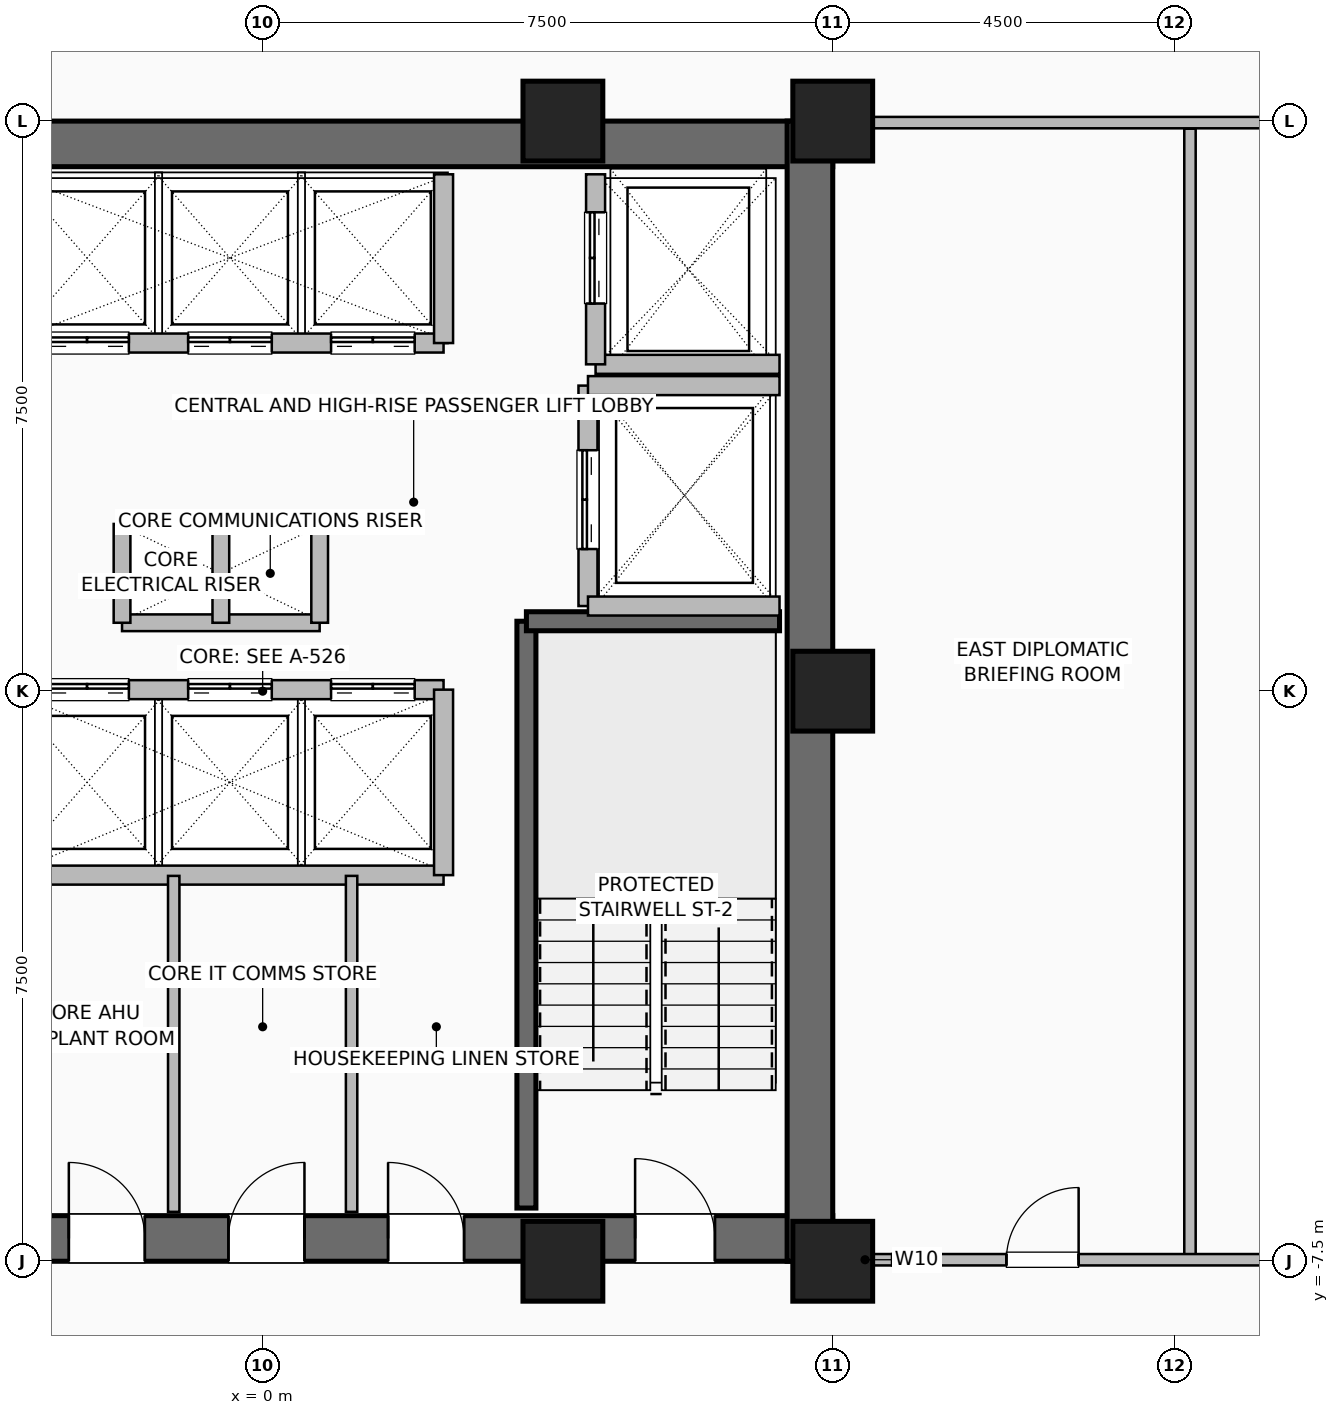
"""IFC4 building model, lengths in metres.
Left out: names, types, materials, properties, quantities, classifications, styles, units other than length and angle.
Written with IfcOpenShell. Run it as: python <this file> out.ifc"""

import sys

from ifc_helpers import new_model, si_unit, direction, frame, frame_2d, origin, origin_2d, place, context, subcontext, project, spatial, rectangle, hollow_rectangle, extrude, element, fill, save


model = new_model("IFC4")
c1 = context("Model", 3, precision=1e-05, world=origin(), true_north=direction((0.0, 1.0)))
c2 = subcontext(c1, "Body", "Model", "MODEL_VIEW")
j1 = project(units=[si_unit("LENGTHUNIT", "METRE"), si_unit("PLANEANGLEUNIT", "RADIAN")], contexts=[c1])
p1 = place(None, origin())
s1 = spatial("IfcSite", under=j1, at=p1, CompositionType="ELEMENT")
p2 = place(p1, origin())
s2 = spatial("IfcBuilding", under=s1, at=p2, CompositionType="ELEMENT")
p3 = place(p2, frame((0.0, 0.0, 101.2)))
s3 = spatial("IfcBuildingStorey", under=s2, at=p3, CompositionType="ELEMENT", Elevation=101.2)
for number, where, z_axis, x_axis in (
    (1, (3.95, -7.5, 0.0), (0.0, 0.0, 1.0), (1.0, 0.0, 0.0)),
    (2, (7.5, -7.5, 0.0), (0.0, 0.0, 1.0), (1.0, 0.0, 0.0)),
    (3, (7.5, 0.0, 0.0), (0.0, 0.0, 1.0), (1.0, 0.0, 0.0)),
    (4, (7.5, 7.5, 0.0), (0.0, 0.0, 1.0), (1.0, 0.0, 0.0)),
    (5, (3.95, 7.5, 0.0), (0.0, 0.0, 1.0), (1.0, 0.0, 0.0)),
):
    element("IfcColumn", number, at=place(p3, frame(where, z_axis=z_axis, x_axis=x_axis)), inside=s3, PredefinedType="COLUMN", context=c2, shape_type="SweptSolid", body=[
        extrude(hollow_rectangle(XDim=1.05, YDim=1.05, WallThickness=0.05, at=origin_2d()), origin(), (0.0, 0.0, 1.0), 3.6),
    ])
p4 = place(p3, frame((-7.5, -7.2, 0.0), z_axis=(0.0, 0.0, 1.0), x_axis=(1.0, 0.0, 0.0)))
e6 = element("IfcWall", 6, at=p4, inside=s3, PredefinedType="SHEAR", context=c2, shape_type="SweptSolid", body=[
    extrude(rectangle(XDim=15.0, YDim=0.6, at=frame_2d((7.5, 0.0))), origin(), (0.0, 0.0, 1.0), 3.36),
])
p5 = place(p4, frame((1.55, 0.0, 0.0)))
e7 = element("IfcOpeningElement", 7, at=p5, cuts=e6, PredefinedType="OPENING", context=c2, shape_type="SweptSolid", body=[
    extrude(rectangle(XDim=1.05, YDim=2.08, at=frame_2d((0.525, 1.04))), frame((0.0, 0.31, 0.0), z_axis=(0.0, -1.0, 0.0), x_axis=(1.0, 0.0, 0.0)), (0.0, 0.0, 1.0), 0.62),
])
p6 = place(p4, frame((12.4, 0.0, 0.0)))
e8 = element("IfcOpeningElement", 8, at=p6, cuts=e6, PredefinedType="OPENING", context=c2, shape_type="SweptSolid", body=[
    extrude(rectangle(XDim=1.05, YDim=2.08, at=frame_2d((0.525, 1.04))), frame((0.0, 0.31, 0.0), z_axis=(0.0, -1.0, 0.0), x_axis=(1.0, 0.0, 0.0)), (0.0, 0.0, 1.0), 0.62),
])
p7 = place(p4, frame((4.95, 0.0, 0.0)))
e9 = element("IfcOpeningElement", 9, at=p7, cuts=e6, PredefinedType="OPENING", context=c2, shape_type="SweptSolid", body=[
    extrude(rectangle(XDim=1.0, YDim=2.08, at=frame_2d((0.5, 1.04))), frame((0.0, 0.31, 0.0), z_axis=(0.0, -1.0, 0.0), x_axis=(1.0, 0.0, 0.0)), (0.0, 0.0, 1.0), 0.62),
])
p8 = place(p4, frame((7.05, 0.0, 0.0)))
e10 = element("IfcOpeningElement", 10, at=p8, cuts=e6, PredefinedType="OPENING", context=c2, shape_type="SweptSolid", body=[
    extrude(rectangle(XDim=1.0, YDim=2.08, at=frame_2d((0.5, 1.04))), frame((0.0, 0.31, 0.0), z_axis=(0.0, -1.0, 0.0), x_axis=(1.0, 0.0, 0.0)), (0.0, 0.0, 1.0), 0.62),
])
p9 = place(p4, frame((9.15, 0.0, 0.0)))
e11 = element("IfcOpeningElement", 11, at=p9, cuts=e6, PredefinedType="OPENING", context=c2, shape_type="SweptSolid", body=[
    extrude(rectangle(XDim=1.0, YDim=2.08, at=frame_2d((0.5, 1.04))), frame((0.0, 0.31, 0.0), z_axis=(0.0, -1.0, 0.0), x_axis=(1.0, 0.0, 0.0)), (0.0, 0.0, 1.0), 0.62),
])
for number, where, z_axis, x_axis in (
    (12, (-7.5, 7.2, 0.0), (0.0, 0.0, 1.0), (1.0, 0.0, 0.0)),
    (13, (7.2, -7.5, 0.0), (0.0, 0.0, 1.0), (0.0, 1.0, 0.0)),
):
    element("IfcWall", number, at=place(p3, frame(where, z_axis=z_axis, x_axis=x_axis)), inside=s3, PredefinedType="SHEAR", context=c2, shape_type="SweptSolid", body=[
        extrude(rectangle(XDim=15.0, YDim=0.6, at=frame_2d((7.5, 0.0))), origin(), (0.0, 0.0, 1.0), 3.36),
    ])
p10 = place(p3, frame((3.47, -6.8, 0.0), z_axis=(0.0, 0.0, 1.0), x_axis=(0.0, 1.0, 0.0)))
e14 = element("IfcWall", 14, at=p10, inside=s3, PredefinedType="SHEAR", context=c2, shape_type="SweptSolid", body=[
    extrude(rectangle(XDim=7.72, YDim=0.25, at=frame_2d((3.86, 0.0))), origin(), (0.0, 0.0, 1.0), 3.36),
])
p11 = place(p3, frame((3.47, 0.92, 0.0), z_axis=(0.0, 0.0, 1.0), x_axis=(1.0, 0.0, 0.0)))
e15 = element("IfcWall", 15, at=p11, inside=s3, PredefinedType="SHEAR", context=c2, shape_type="SweptSolid", body=[
    extrude(rectangle(XDim=3.33, YDim=0.25, at=frame_2d((1.665, 0.0))), origin(), (0.0, 0.0, 1.0), 3.36),
])
for number, where, z_axis, x_axis in (
    (16, (-1.85, 2.2, 0.0), (0.0, 0.0, 1.0), (1.0, 0.0, 0.0)),
    (17, (-1.85, 0.9, 0.0), (0.0, 0.0, 1.0), (1.0, 0.0, 0.0)),
):
    element("IfcWall", number, at=place(p3, frame(where, z_axis=z_axis, x_axis=x_axis)), inside=s3, PredefinedType="PARTITIONING", context=c2, shape_type="SweptSolid", body=[
        extrude(rectangle(XDim=2.6, YDim=0.22, at=frame_2d((1.3, 0.0))), origin(), (0.0, 0.0, 1.0), 3.36),
    ])
for number, where, z_axis, x_axis in (
    (18, (-0.55, 0.9, 0.0), (0.0, 0.0, 1.0), (0.0, 1.0, 0.0)),
    (19, (0.75, 0.9, 0.0), (0.0, 0.0, 1.0), (0.0, 1.0, 0.0)),
    (20, (-1.85, 0.9, 0.0), (0.0, 0.0, 1.0), (0.0, 1.0, 0.0)),
):
    element("IfcWall", number, at=place(p3, frame(where, z_axis=z_axis, x_axis=x_axis)), inside=s3, PredefinedType="PARTITIONING", context=c2, shape_type="SweptSolid", body=[
        extrude(rectangle(XDim=1.3, YDim=0.22, at=frame_2d((0.65, 0.0))), origin(), (0.0, 0.0, 1.0), 3.36),
    ])
p12 = place(p3, frame((-3.26, 0.02, 0.0), z_axis=(0.0, 0.0, 1.0), x_axis=(1.0, 0.0, 0.0)))
e21 = element("IfcWall", 21, at=p12, inside=s3, PredefinedType="SHEAR", context=c2, shape_type="SweptSolid", body=[
    extrude(rectangle(XDim=5.64, YDim=0.25, at=frame_2d((2.82, 0.0))), origin(), (0.0, 0.0, 1.0), 3.36),
])
p13 = place(p12, frame((0.4, 0.0, 0.0)))
e22 = element("IfcOpeningElement", 22, at=p13, cuts=e21, PredefinedType="OPENING", context=c2, shape_type="SweptSolid", body=[
    extrude(rectangle(XDim=1.1, YDim=2.2, at=frame_2d((0.55, 1.1))), frame((0.0, 0.135, 0.0), z_axis=(0.0, -1.0, 0.0), x_axis=(1.0, 0.0, 0.0)), (0.0, 0.0, 1.0), 0.27),
])
p14 = place(p12, frame((2.28, 0.0, 0.0)))
e23 = element("IfcOpeningElement", 23, at=p14, cuts=e21, PredefinedType="OPENING", context=c2, shape_type="SweptSolid", body=[
    extrude(rectangle(XDim=1.1, YDim=2.2, at=frame_2d((0.55, 1.1))), frame((0.0, 0.135, 0.0), z_axis=(0.0, -1.0, 0.0), x_axis=(1.0, 0.0, 0.0)), (0.0, 0.0, 1.0), 0.27),
])
p15 = place(p12, frame((4.16, 0.0, 0.0)))
e24 = element("IfcOpeningElement", 24, at=p15, cuts=e21, PredefinedType="OPENING", context=c2, shape_type="SweptSolid", body=[
    extrude(rectangle(XDim=1.1, YDim=2.2, at=frame_2d((0.55, 1.1))), frame((0.0, 0.135, 0.0), z_axis=(0.0, -1.0, 0.0), x_axis=(1.0, 0.0, 0.0)), (0.0, 0.0, 1.0), 0.27),
])
p16 = place(p3, frame((-3.26, -2.42, 0.0), z_axis=(0.0, 0.0, 1.0), x_axis=(1.0, 0.0, 0.0)))
e25 = element("IfcWall", 25, at=p16, inside=s3, PredefinedType="SHEAR", context=c2, shape_type="SweptSolid", body=[
    extrude(rectangle(XDim=5.64, YDim=0.25, at=frame_2d((2.82, 0.0))), origin(), (0.0, 0.0, 1.0), 3.36),
])
p17 = place(p3, frame((2.38, -2.42, 0.0), z_axis=(0.0, 0.0, 1.0), x_axis=(0.0, 1.0, 0.0)))
e26 = element("IfcWall", 26, at=p17, inside=s3, PredefinedType="SHEAR", context=c2, shape_type="SweptSolid", body=[
    extrude(rectangle(XDim=2.44, YDim=0.25, at=frame_2d((1.22, 0.0))), origin(), (0.0, 0.0, 1.0), 3.36),
])
p18 = place(p3, frame((-3.26, 4.58, 0.0), z_axis=(0.0, 0.0, 1.0), x_axis=(1.0, 0.0, 0.0)))
e27 = element("IfcWall", 27, at=p18, inside=s3, PredefinedType="SHEAR", context=c2, shape_type="SweptSolid", body=[
    extrude(rectangle(XDim=5.64, YDim=0.25, at=frame_2d((2.82, 0.0))), origin(), (0.0, 0.0, 1.0), 3.36),
])
p19 = place(p18, frame((0.4, 0.0, 0.0)))
e28 = element("IfcOpeningElement", 28, at=p19, cuts=e27, PredefinedType="OPENING", context=c2, shape_type="SweptSolid", body=[
    extrude(rectangle(XDim=1.1, YDim=2.2, at=frame_2d((0.55, 1.1))), frame((0.0, 0.135, 0.0), z_axis=(0.0, -1.0, 0.0), x_axis=(1.0, 0.0, 0.0)), (0.0, 0.0, 1.0), 0.27),
])
p20 = place(p18, frame((2.28, 0.0, 0.0)))
e29 = element("IfcOpeningElement", 29, at=p20, cuts=e27, PredefinedType="OPENING", context=c2, shape_type="SweptSolid", body=[
    extrude(rectangle(XDim=1.1, YDim=2.2, at=frame_2d((0.55, 1.1))), frame((0.0, 0.135, 0.0), z_axis=(0.0, -1.0, 0.0), x_axis=(1.0, 0.0, 0.0)), (0.0, 0.0, 1.0), 0.27),
])
p21 = place(p18, frame((4.16, 0.0, 0.0)))
e30 = element("IfcOpeningElement", 30, at=p21, cuts=e27, PredefinedType="OPENING", context=c2, shape_type="SweptSolid", body=[
    extrude(rectangle(XDim=1.1, YDim=2.2, at=frame_2d((0.55, 1.1))), frame((0.0, 0.135, 0.0), z_axis=(0.0, -1.0, 0.0), x_axis=(1.0, 0.0, 0.0)), (0.0, 0.0, 1.0), 0.27),
])
p22 = place(p3, frame((2.38, 4.58, 0.0), z_axis=(0.0, 0.0, 1.0), x_axis=(0.0, 1.0, 0.0)))
e31 = element("IfcWall", 31, at=p22, inside=s3, PredefinedType="SHEAR", context=c2, shape_type="SweptSolid", body=[
    extrude(rectangle(XDim=2.22, YDim=0.25, at=frame_2d((1.11, 0.0))), origin(), (0.0, 0.0, 1.0), 3.36),
])
p23 = place(p3, frame((4.38, 4.3, 0.0), z_axis=(0.0, 0.0, 1.0), x_axis=(1.0, 0.0, 0.0)))
e32 = element("IfcWall", 32, at=p23, inside=s3, PredefinedType="SHEAR", context=c2, shape_type="SweptSolid", body=[
    extrude(rectangle(XDim=2.42, YDim=0.25, at=frame_2d((1.21, 0.0))), origin(), (0.0, 0.0, 1.0), 3.36),
])
p24 = place(p3, frame((4.38, 4.3, 0.0), z_axis=(0.0, 0.0, 1.0), x_axis=(0.0, 1.0, 0.0)))
e33 = element("IfcWall", 33, at=p24, inside=s3, PredefinedType="SHEAR", context=c2, shape_type="SweptSolid", body=[
    extrude(rectangle(XDim=2.5, YDim=0.25, at=frame_2d((1.25, 0.0))), origin(), (0.0, 0.0, 1.0), 3.36),
])
p25 = place(p24, frame((0.8, 0.0, 0.0)))
e34 = element("IfcOpeningElement", 34, at=p25, cuts=e33, PredefinedType="OPENING", context=c2, shape_type="SweptSolid", body=[
    extrude(rectangle(XDim=1.2, YDim=2.2, at=frame_2d((0.6, 1.1))), frame((0.0, 0.135, 0.0), z_axis=(0.0, -1.0, 0.0), x_axis=(1.0, 0.0, 0.0)), (0.0, 0.0, 1.0), 0.27),
])
p26 = place(p3, frame((4.28, 1.12, 0.0), z_axis=(0.0, 0.0, 1.0), x_axis=(0.0, 1.0, 0.0)))
e35 = element("IfcWall", 35, at=p26, inside=s3, PredefinedType="SHEAR", context=c2, shape_type="SweptSolid", body=[
    extrude(rectangle(XDim=2.9, YDim=0.25, at=frame_2d((1.45, 0.0))), origin(), (0.0, 0.0, 1.0), 3.36),
])
p27 = place(p26, frame((0.75, 0.0, 0.0)))
e36 = element("IfcOpeningElement", 36, at=p27, cuts=e35, PredefinedType="OPENING", context=c2, shape_type="SweptSolid", body=[
    extrude(rectangle(XDim=1.3, YDim=2.3, at=frame_2d((0.65, 1.15))), frame((0.0, 0.135, 0.0), z_axis=(0.0, -1.0, 0.0), x_axis=(1.0, 0.0, 0.0)), (0.0, 0.0, 1.0), 0.27),
])
for number, where, z_axis, x_axis in (
    (37, (4.28, 1.12, 0.0), (0.0, 0.0, 1.0), (1.0, 0.0, 0.0)),
    (38, (4.28, 4.02, 0.0), (0.0, 0.0, 1.0), (1.0, 0.0, 0.0)),
):
    element("IfcWall", number, at=place(p3, frame(where, z_axis=z_axis, x_axis=x_axis)), inside=s3, PredefinedType="SHEAR", context=c2, shape_type="SweptSolid", body=[
        extrude(rectangle(XDim=2.52, YDim=0.25, at=frame_2d((1.26, 0.0))), origin(), (0.0, 0.0, 1.0), 3.36),
    ])
for number, where, z_axis, x_axis in (
    (39, (-1.17, -6.85, 0.0), (0.0, 0.0, 1.0), (0.0, 1.0, 0.0)),
    (40, (1.17, -6.85, 0.0), (0.0, 0.0, 1.0), (0.0, 1.0, 0.0)),
):
    element("IfcWall", number, at=place(p3, frame(where, z_axis=z_axis, x_axis=x_axis)), inside=s3, PredefinedType="PARTITIONING", context=c2, shape_type="SweptSolid", body=[
        extrude(rectangle(XDim=4.42, YDim=0.15, at=frame_2d((2.21, 0.0))), origin(), (0.0, 0.0, 1.0), 3.36),
    ])
p28 = place(p3, frame((7.45, -7.48, 0.0), z_axis=(0.0, 0.0, 1.0), x_axis=(1.0, 0.0, 0.0)))
e41 = element("IfcWall", 41, at=p28, inside=s3, PredefinedType="PARTITIONING", context=c2, shape_type="SweptSolid", body=[
    extrude(rectangle(XDim=0.95, YDim=0.15, at=frame_2d((0.475, 0.0))), origin(), (0.0, 0.0, 1.0), 3.36),
])
p29 = place(p3, frame((12.2, -7.48, 0.0), z_axis=(0.0, 0.0, 1.0), x_axis=(0.0, 1.0, 0.0)))
e42 = element("IfcWall", 42, at=p29, inside=s3, PredefinedType="PARTITIONING", context=c2, shape_type="SweptSolid", body=[
    extrude(rectangle(XDim=14.88, YDim=0.15, at=frame_2d((7.44, 0.0))), origin(), (0.0, 0.0, 1.0), 3.36),
])
p30 = place(p3, frame((8.28, -7.48, 0.0), z_axis=(0.0, 0.0, 1.0), x_axis=(1.0, 0.0, 0.0)))
e43 = element("IfcWall", 43, at=p30, inside=s3, PredefinedType="PARTITIONING", context=c2, shape_type="SweptSolid", body=[
    extrude(rectangle(XDim=13.54, YDim=0.15, at=frame_2d((6.77, 0.0))), origin(), (0.0, 0.0, 1.0), 3.36),
])
p31 = place(p30, frame((1.505, 0.0, 0.0)))
e44 = element("IfcOpeningElement", 44, at=p31, cuts=e43, PredefinedType="OPENING", context=c2, shape_type="SweptSolid", body=[
    extrude(rectangle(XDim=0.95, YDim=2.06, at=frame_2d((0.475, 1.03))), frame((0.0, 0.085, 0.0), z_axis=(0.0, -1.0, 0.0), x_axis=(1.0, 0.0, 0.0)), (0.0, 0.0, 1.0), 0.17),
])
p32 = place(p30, frame((8.195, 0.0, 0.0)))
e45 = element("IfcOpeningElement", 45, at=p32, cuts=e43, PredefinedType="OPENING", context=c2, shape_type="SweptSolid", body=[
    extrude(rectangle(XDim=0.95, YDim=2.06, at=frame_2d((0.475, 1.03))), frame((0.0, 0.085, 0.0), z_axis=(0.0, -1.0, 0.0), x_axis=(1.0, 0.0, 0.0)), (0.0, 0.0, 1.0), 0.17),
])
p33 = place(p3, frame((7.6, 7.48, 0.0), z_axis=(0.0, 0.0, 1.0), x_axis=(1.0, 0.0, 0.0)))
e46 = element("IfcWall", 46, at=p33, inside=s3, PredefinedType="PARTITIONING", context=c2, shape_type="SweptSolid", body=[
    extrude(rectangle(XDim=14.22, YDim=0.15, at=frame_2d((7.11, 0.0))), origin(), (0.0, 0.0, 1.0), 3.36),
])
p34 = place(p6, origin())
e47 = element("IfcDoor", 47, at=p34, inside=s3, OperationType="SINGLE_SWING_LEFT", PredefinedType="DOOR", context=c2, shape_type="SweptSolid", body=[
    extrude(rectangle(XDim=1.05, YDim=2.08, at=frame_2d((0.525, 1.04))), frame((0.0, 0.025, 0.0), z_axis=(0.0, -1.0, 0.0), x_axis=(1.0, 0.0, 0.0)), (0.0, 0.0, 1.0), 0.05),
])
fill(e8, e47)
p35 = place(p7, origin())
e48 = element("IfcDoor", 48, at=p35, inside=s3, OperationType="SINGLE_SWING_LEFT", PredefinedType="DOOR", context=c2, shape_type="SweptSolid", body=[
    extrude(rectangle(XDim=1.0, YDim=2.08, at=frame_2d((0.5, 1.04))), frame((0.0, 0.025, 0.0), z_axis=(0.0, -1.0, 0.0), x_axis=(1.0, 0.0, 0.0)), (0.0, 0.0, 1.0), 0.05),
])
fill(e9, e48)
p36 = place(p8, origin())
e49 = element("IfcDoor", 49, at=p36, inside=s3, OperationType="SINGLE_SWING_RIGHT", PredefinedType="DOOR", context=c2, shape_type="SweptSolid", body=[
    extrude(rectangle(XDim=1.0, YDim=2.08, at=frame_2d((0.5, 1.04))), frame((0.0, 0.025, 0.0), z_axis=(0.0, -1.0, 0.0), x_axis=(1.0, 0.0, 0.0)), (0.0, 0.0, 1.0), 0.05),
])
fill(e10, e49)
p37 = place(p9, origin())
e50 = element("IfcDoor", 50, at=p37, inside=s3, OperationType="SINGLE_SWING_LEFT", PredefinedType="DOOR", context=c2, shape_type="SweptSolid", body=[
    extrude(rectangle(XDim=1.0, YDim=2.08, at=frame_2d((0.5, 1.04))), frame((0.0, 0.025, 0.0), z_axis=(0.0, -1.0, 0.0), x_axis=(1.0, 0.0, 0.0)), (0.0, 0.0, 1.0), 0.05),
])
fill(e11, e50)
p38 = place(p13, origin())
e51 = element("IfcDoor", 51, at=p38, inside=s3, OperationType="DOUBLE_DOOR_SLIDING", PredefinedType="DOOR", context=c2, shape_type="SweptSolid", body=[
    extrude(rectangle(XDim=1.1, YDim=2.2, at=frame_2d((0.55, 1.1))), frame((0.0, 0.025, 0.0), z_axis=(0.0, -1.0, 0.0), x_axis=(1.0, 0.0, 0.0)), (0.0, 0.0, 1.0), 0.05),
])
fill(e22, e51)
p39 = place(p14, origin())
e52 = element("IfcDoor", 52, at=p39, inside=s3, OperationType="DOUBLE_DOOR_SLIDING", PredefinedType="DOOR", context=c2, shape_type="SweptSolid", body=[
    extrude(rectangle(XDim=1.1, YDim=2.2, at=frame_2d((0.55, 1.1))), frame((0.0, 0.025, 0.0), z_axis=(0.0, -1.0, 0.0), x_axis=(1.0, 0.0, 0.0)), (0.0, 0.0, 1.0), 0.05),
])
fill(e23, e52)
p40 = place(p15, origin())
e53 = element("IfcDoor", 53, at=p40, inside=s3, OperationType="DOUBLE_DOOR_SLIDING", PredefinedType="DOOR", context=c2, shape_type="SweptSolid", body=[
    extrude(rectangle(XDim=1.1, YDim=2.2, at=frame_2d((0.55, 1.1))), frame((0.0, 0.025, 0.0), z_axis=(0.0, -1.0, 0.0), x_axis=(1.0, 0.0, 0.0)), (0.0, 0.0, 1.0), 0.05),
])
fill(e24, e53)
p41 = place(p19, origin())
e54 = element("IfcDoor", 54, at=p41, inside=s3, OperationType="DOUBLE_DOOR_SLIDING", PredefinedType="DOOR", context=c2, shape_type="SweptSolid", body=[
    extrude(rectangle(XDim=1.1, YDim=2.2, at=frame_2d((0.55, 1.1))), frame((0.0, 0.025, 0.0), z_axis=(0.0, -1.0, 0.0), x_axis=(1.0, 0.0, 0.0)), (0.0, 0.0, 1.0), 0.05),
])
fill(e28, e54)
p42 = place(p20, origin())
e55 = element("IfcDoor", 55, at=p42, inside=s3, OperationType="DOUBLE_DOOR_SLIDING", PredefinedType="DOOR", context=c2, shape_type="SweptSolid", body=[
    extrude(rectangle(XDim=1.1, YDim=2.2, at=frame_2d((0.55, 1.1))), frame((0.0, 0.025, 0.0), z_axis=(0.0, -1.0, 0.0), x_axis=(1.0, 0.0, 0.0)), (0.0, 0.0, 1.0), 0.05),
])
fill(e29, e55)
p43 = place(p21, origin())
e56 = element("IfcDoor", 56, at=p43, inside=s3, OperationType="DOUBLE_DOOR_SLIDING", PredefinedType="DOOR", context=c2, shape_type="SweptSolid", body=[
    extrude(rectangle(XDim=1.1, YDim=2.2, at=frame_2d((0.55, 1.1))), frame((0.0, 0.025, 0.0), z_axis=(0.0, -1.0, 0.0), x_axis=(1.0, 0.0, 0.0)), (0.0, 0.0, 1.0), 0.05),
])
fill(e30, e56)
p44 = place(p25, origin())
e57 = element("IfcDoor", 57, at=p44, inside=s3, OperationType="DOUBLE_DOOR_SLIDING", PredefinedType="DOOR", context=c2, shape_type="SweptSolid", body=[
    extrude(rectangle(XDim=1.2, YDim=2.2, at=frame_2d((0.6, 1.1))), frame((0.0, 0.025, 0.0), z_axis=(0.0, -1.0, 0.0), x_axis=(1.0, 0.0, 0.0)), (0.0, 0.0, 1.0), 0.05),
])
fill(e34, e57)
p45 = place(p27, origin())
e58 = element("IfcDoor", 58, at=p45, inside=s3, OperationType="DOUBLE_DOOR_SLIDING", PredefinedType="DOOR", context=c2, shape_type="SweptSolid", body=[
    extrude(rectangle(XDim=1.3, YDim=2.3, at=frame_2d((0.65, 1.15))), frame((0.0, 0.025, 0.0), z_axis=(0.0, -1.0, 0.0), x_axis=(1.0, 0.0, 0.0)), (0.0, 0.0, 1.0), 0.05),
])
fill(e36, e58)
p46 = place(p31, origin())
e59 = element("IfcDoor", 59, at=p46, inside=s3, OperationType="SINGLE_SWING_RIGHT", PredefinedType="DOOR", context=c2, shape_type="SweptSolid", body=[
    extrude(rectangle(XDim=0.95, YDim=2.06, at=frame_2d((0.475, 1.03))), frame((0.0, 0.025, 0.0), z_axis=(0.0, -1.0, 0.0), x_axis=(1.0, 0.0, 0.0)), (0.0, 0.0, 1.0), 0.05),
])
fill(e44, e59)
save(model, sys.argv[1])
